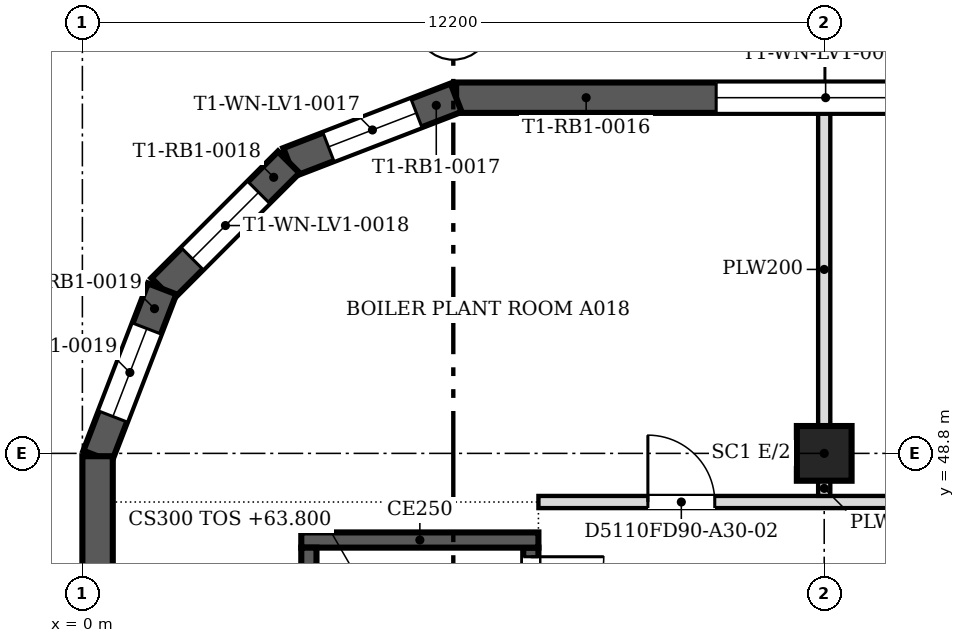
"""IFC4 building model, lengths in metres.
Left out: names, types, materials, properties, quantities, classifications, styles, units other than length and angle.
Written with IfcOpenShell. Run it as: python <this file> out.ifc"""

import sys

from ifc_helpers import new_model, si_unit, direction, frame, frame_2d, origin, origin_2d, place, context, subcontext, project, spatial, polyline, rectangle, outline, extrude, faceted_brep, source, transform, mapped, element, fill, save


model = new_model("IFC4")
c1 = context("Model", 3, precision=1e-05, world=origin(), true_north=direction((0.0, 1.0)))
c2 = subcontext(c1, "Body", "Model", "MODEL_VIEW")
j1 = project(units=[si_unit("LENGTHUNIT", "METRE"), si_unit("PLANEANGLEUNIT", "RADIAN")], contexts=[c1])
p1 = place(None, origin())
s1 = spatial("IfcSite", under=j1, at=p1, CompositionType="ELEMENT")
p2 = place(p1, origin())
s2 = spatial("IfcBuilding", under=s1, at=p2, CompositionType="ELEMENT")
p3 = place(p2, frame((0.0, 0.0, 63.8)))
s3 = spatial("IfcBuildingStorey", under=s2, at=p3, CompositionType="ELEMENT", Elevation=63.8)
p4 = place(p3, frame((12.2, 48.8, 0.0), z_axis=(0.0, 0.0, 1.0), x_axis=(1.0, 0.0, 0.0)))
e1 = element("IfcColumn", 1, at=p4, inside=s3, PredefinedType="COLUMN", context=c2, shape_type="SweptSolid", body=[
    extrude(rectangle(XDim=0.9, YDim=0.9, at=origin_2d()), origin(), (0.0, 0.0, 1.0), 4.6),
])
m1 = source(origin(), c2, "Body", "Brep", [
    faceted_brep([(0.0, -0.25, 0.0), (12.154, -0.25, 0.0), (12.154, -0.25, 4.8), (0.0, -0.25, 4.8), (0.0, 0.25, 4.8), (12.107, 0.25, 4.8), (12.107, 0.25, 0.0), (0.0, 0.25, 0.0), (12.154, -0.0, 0.0), (12.154, -0.0, 4.8)], [[[0, 1, 2, 3]], [[4, 5, 6, 7]], [[7, 6, 8, 1, 0]], [[9, 2, 1, 8]], [[5, 4, 3, 2, 9]], [[4, 7, 0, 3]], [[8, 6, 5, 9]]]),
])
p5 = place(p3, frame((18.3, 54.65, 0.0), z_axis=(0.0, 0.0, 1.0), x_axis=(-1.0, 0.0, 0.0)))
e2 = element("IfcWall", 2, at=p5, inside=s3, PredefinedType="SOLIDWALL", context=c2, shape_type="MappedRepresentation", body=[
    mapped(m1, transform((0.0, 0.0, 0.0), scale=1.0)),
])
m2 = source(origin(), c2, "Body", "SweptSolid", [
    extrude(outline(polyline([(4.277, 0.8), (7.877, 0.8), (7.877, 4.0), (4.277, 4.0), (4.277, 0.8)])), frame((0.0, 0.26, 0.0), z_axis=(0.0, -1.0, 0.0), x_axis=(1.0, 0.0, 0.0)), (0.0, 0.0, 1.0), 0.52),
])
p6 = place(p5, origin())
e3 = element("IfcOpeningElement", 3, at=p6, cuts=e2, PredefinedType="OPENING", context=c2, shape_type="MappedRepresentation", body=[
    mapped(m2, transform((0.0, 0.0, 0.0), scale=1.0)),
])
m3 = source(origin(), c2, "Body", "Brep", [
    faceted_brep([(0.0, -0.25, 0.0), (2.95, -0.25, 0.0), (2.95, -0.25, 4.8), (0.0, -0.25, 4.8), (0.047, 0.25, 4.8), (2.898, 0.25, 4.8), (2.898, 0.25, 0.0), (0.047, 0.25, 0.0), (2.95, 0.0, 0.0), (0.0, 0.0, 0.0), (2.95, 0.0, 4.8), (0.0, 0.0, 4.8)], [[[0, 1, 2, 3]], [[4, 5, 6, 7]], [[7, 6, 8, 1, 0, 9]], [[10, 2, 1, 8]], [[5, 4, 11, 3, 2, 10]], [[9, 0, 3, 11]], [[7, 9, 11, 4]], [[8, 6, 5, 10]]]),
])
p7 = place(p3, frame((6.146, 54.65, 0.0), z_axis=(0.0, 0.0, 1.0), x_axis=(-0.932999673775, -0.359877213415, 0.0)))
e4 = element("IfcWall", 4, at=p7, inside=s3, PredefinedType="SOLIDWALL", context=c2, shape_type="MappedRepresentation", body=[
    mapped(m3, transform((0.0, 0.0, 0.0), scale=1.0)),
])
m4 = source(origin(), c2, "Body", "SweptSolid", [
    extrude(outline(polyline([(0.7, 0.8), (2.25, 0.8), (2.25, 4.0), (0.7, 4.0), (0.7, 0.8)])), frame((0.0, 0.26, 0.0), z_axis=(0.0, -1.0, 0.0), x_axis=(1.0, 0.0, 0.0)), (0.0, 0.0, 1.0), 0.52),
])
p8 = place(p7, origin())
e5 = element("IfcOpeningElement", 5, at=p8, cuts=e4, PredefinedType="OPENING", context=c2, shape_type="MappedRepresentation", body=[
    mapped(m4, transform((0.0, 0.0, 0.0), scale=1.0)),
])
m5 = source(origin(), c2, "Body", "Brep", [
    faceted_brep([(0.0, -0.25, 0.0), (2.944, -0.25, 0.0), (2.944, -0.25, 4.8), (0.0, -0.25, 4.8), (0.053, 0.25, 4.8), (2.891, 0.25, 4.8), (2.891, 0.25, 0.0), (0.053, 0.25, 0.0), (2.944, 0.0, 0.0), (0.0, 0.0, 0.0), (2.944, 0.0, 4.8), (0.0, 0.0, 4.8)], [[[0, 1, 2, 3]], [[4, 5, 6, 7]], [[7, 6, 8, 1, 0, 9]], [[10, 2, 1, 8]], [[5, 4, 11, 3, 2, 10]], [[9, 0, 3, 11]], [[7, 9, 11, 4]], [[8, 6, 5, 10]]]),
])
p9 = place(p3, frame((3.394, 53.588, 0.0), z_axis=(0.0, 0.0, 1.0), x_axis=(-0.707106781187, -0.707106781187, 0.0)))
e6 = element("IfcWall", 6, at=p9, inside=s3, PredefinedType="SOLIDWALL", context=c2, shape_type="MappedRepresentation", body=[
    mapped(m5, transform((0.0, 0.0, 0.0), scale=1.0)),
])
m6 = source(origin(), c2, "Body", "SweptSolid", [
    extrude(outline(polyline([(0.7, 0.8), (2.244, 0.8), (2.244, 4.0), (0.7, 4.0), (0.7, 0.8)])), frame((0.0, 0.26, 0.0), z_axis=(0.0, -1.0, 0.0), x_axis=(1.0, 0.0, 0.0)), (0.0, 0.0, 1.0), 0.52),
])
p10 = place(p9, origin())
e7 = element("IfcOpeningElement", 7, at=p10, cuts=e6, PredefinedType="OPENING", context=c2, shape_type="MappedRepresentation", body=[
    mapped(m6, transform((0.0, 0.0, 0.0), scale=1.0)),
])
m7 = source(origin(), c2, "Body", "Brep", [
    faceted_brep([(0.0, -0.25, 0.0), (2.95, -0.25, 0.0), (2.95, -0.25, 4.8), (0.0, -0.25, 4.8), (0.053, 0.25, 4.8), (2.904, 0.25, 4.8), (2.904, 0.25, 0.0), (0.053, 0.25, 0.0), (2.95, 0.0, 0.0), (0.0, 0.0, 0.0), (2.95, 0.0, 4.8), (0.0, 0.0, 4.8)], [[[0, 1, 2, 3]], [[4, 5, 6, 7]], [[7, 6, 8, 1, 0, 9]], [[10, 2, 1, 8]], [[5, 4, 11, 3, 2, 10]], [[9, 0, 3, 11]], [[7, 9, 11, 4]], [[8, 6, 5, 10]]]),
])
p11 = place(p3, frame((1.312, 51.506, 0.0), z_axis=(0.0, 0.0, 1.0), x_axis=(-0.359921456299, -0.932982607178, 0.0)))
e8 = element("IfcWall", 8, at=p11, inside=s3, PredefinedType="SOLIDWALL", context=c2, shape_type="MappedRepresentation", body=[
    mapped(m7, transform((0.0, 0.0, 0.0), scale=1.0)),
])
p12 = place(p11, origin())
e9 = element("IfcOpeningElement", 9, at=p12, cuts=e8, PredefinedType="OPENING", context=c2, shape_type="MappedRepresentation", body=[
    mapped(m4, transform((0.0, 0.0, 0.0), scale=1.0)),
])
m8 = source(origin(), c2, "Body", "Brep", [
    faceted_brep([(0.0, -0.25, 0.0), (12.154, -0.25, 0.0), (12.154, -0.25, 4.8), (0.0, -0.25, 4.8), (0.047, 0.25, 4.8), (12.154, 0.25, 4.8), (12.154, 0.25, 0.0), (0.047, 0.25, 0.0), (0.0, 0.0, 0.0), (0.0, 0.0, 4.8)], [[[0, 1, 2, 3]], [[4, 5, 6, 7]], [[7, 6, 1, 0, 8]], [[5, 4, 9, 3, 2]], [[8, 0, 3, 9]], [[7, 8, 9, 4]], [[1, 6, 5, 2]]]),
])
p13 = place(p3, frame((0.25, 48.753, 0.0), z_axis=(0.0, 0.0, 1.0), x_axis=(0.0, -1.0, 0.0)))
e10 = element("IfcWall", 10, at=p13, inside=s3, PredefinedType="SOLIDWALL", context=c2, shape_type="MappedRepresentation", body=[
    mapped(m8, transform((0.0, 0.0, 0.0), scale=1.0)),
])
p14 = place(p13, origin())
e11 = element("IfcOpeningElement", 11, at=p14, cuts=e10, PredefinedType="OPENING", context=c2, shape_type="MappedRepresentation", body=[
    mapped(m2, transform((0.0, 0.0, 0.0), scale=1.0)),
])
p15 = place(p3, frame((3.725, 39.25, 0.0), z_axis=(0.0, 0.0, 1.0), x_axis=(0.0, 1.0, 0.0)))
e12 = element("IfcWall", 12, at=p15, inside=s3, PredefinedType="SOLIDWALL", context=c2, shape_type="SweptSolid", body=[
    extrude(rectangle(XDim=8.0, YDim=0.25, at=frame_2d((4.0, 0.0))), origin(), (0.0, 0.0, 1.0), 4.8),
])
p16 = place(p3, frame((3.6, 47.375, 0.0), z_axis=(0.0, 0.0, 1.0), x_axis=(1.0, 0.0, 0.0)))
e13 = element("IfcWall", 13, at=p16, inside=s3, PredefinedType="SOLIDWALL", context=c2, shape_type="SweptSolid", body=[
    extrude(rectangle(XDim=3.9, YDim=0.25, at=frame_2d((1.95, 0.0))), origin(), (0.0, 0.0, 1.0), 4.8),
])
p17 = place(p3, frame((7.375, 47.25, 0.0), z_axis=(0.0, 0.0, 1.0), x_axis=(0.0, -1.0, 0.0)))
e14 = element("IfcWall", 14, at=p17, inside=s3, PredefinedType="SOLIDWALL", context=c2, shape_type="SweptSolid", body=[
    extrude(rectangle(XDim=8.0, YDim=0.25, at=frame_2d((4.0, 0.0))), origin(), (0.0, 0.0, 1.0), 4.8),
])
m9 = source(origin(), c2, "Body", "SweptSolid", [
    extrude(rectangle(XDim=1.2, YDim=2.1, at=frame_2d((0.6, 1.05))), frame((0.0, 0.135, 0.0), z_axis=(0.0, -1.0, 0.0), x_axis=(1.0, 0.0, 0.0)), (0.0, 0.0, 1.0), 0.27),
])
p18 = place(p17, frame((0.15, 0.0, 0.0)))
e15 = element("IfcOpeningElement", 15, at=p18, cuts=e14, PredefinedType="OPENING", context=c2, shape_type="MappedRepresentation", body=[
    mapped(m9, transform((0.0, 0.0, 0.0), scale=1.0)),
])
p19 = place(p3, frame((7.5, 48.0, 0.0), z_axis=(0.0, 0.0, 1.0), x_axis=(1.0, 0.0, 0.0)))
e16 = element("IfcWall", 16, at=p19, inside=s3, PredefinedType="PARTITIONING", context=c2, shape_type="SweptSolid", body=[
    extrude(rectangle(XDim=20.6, YDim=0.2, at=frame_2d((10.3, 0.0))), origin(), (0.0, 0.0, 1.0), 4.067),
])
m10 = source(origin(), c2, "Body", "SweptSolid", [
    extrude(rectangle(XDim=1.1, YDim=2.1, at=frame_2d((0.55, 1.05))), frame((0.0, 0.11, 0.0), z_axis=(0.0, -1.0, 0.0), x_axis=(1.0, 0.0, 0.0)), (0.0, 0.0, 1.0), 0.22),
])
p20 = place(p19, frame((1.8, 0.0, 0.0)))
e17 = element("IfcOpeningElement", 17, at=p20, cuts=e16, PredefinedType="OPENING", context=c2, shape_type="MappedRepresentation", body=[
    mapped(m10, transform((0.0, 0.0, 0.0), scale=1.0)),
])
p21 = place(p19, frame((15.301, 0.0, 0.0)))
e18 = element("IfcOpeningElement", 18, at=p21, cuts=e16, PredefinedType="OPENING", context=c2, shape_type="MappedRepresentation", body=[
    mapped(m10, transform((0.0, 0.0, 0.0), scale=1.0)),
])
p22 = place(p19, frame((8.3, 0.0, 0.0)))
e19 = element("IfcOpeningElement", 19, at=p22, cuts=e16, PredefinedType="OPENING", context=c2, shape_type="MappedRepresentation", body=[
    mapped(m10, transform((0.0, 0.0, 0.0), scale=1.0)),
])
p23 = place(p3, frame((12.2, 48.101, 0.0), z_axis=(0.0, 0.0, 1.0), x_axis=(0.0, 1.0, 0.0)))
e20 = element("IfcWall", 20, at=p23, inside=s3, PredefinedType="PARTITIONING", context=c2, shape_type="SweptSolid", body=[
    extrude(rectangle(XDim=0.248, YDim=0.2, at=frame_2d((0.124, 0.0))), origin(), (0.0, 0.0, 1.0), 4.067),
])
p24 = place(p3, frame((12.2, 49.251, 0.0), z_axis=(0.0, 0.0, 1.0), x_axis=(0.0, 1.0, 0.0)))
e21 = element("IfcWall", 21, at=p24, inside=s3, PredefinedType="PARTITIONING", context=c2, shape_type="SweptSolid", body=[
    extrude(rectangle(XDim=5.149, YDim=0.2, at=frame_2d((2.574, 0.0))), origin(), (0.0, 0.0, 1.0), 4.067),
])
m11 = source(origin(), c2, "Body", "SweptSolid", [
    extrude(outline(polyline([(4.277, 0.8), (7.877, 0.8), (7.877, 4.0), (4.277, 4.0), (4.277, 0.8)])), frame((0.0, 0.03, 0.0), z_axis=(0.0, -1.0, 0.0), x_axis=(1.0, 0.0, 0.0)), (0.0, 0.0, 1.0), 0.06),
])
p25 = place(p6, origin())
e22 = element("IfcWindow", 22, at=p25, inside=s3, PartitioningType="USERDEFINED", PredefinedType="WINDOW", context=c2, shape_type="MappedRepresentation", body=[
    mapped(m11, transform((0.0, 0.0, 0.0), scale=1.0)),
])
fill(e3, e22)
m12 = source(origin(), c2, "Body", "SweptSolid", [
    extrude(outline(polyline([(0.7, 0.8), (2.25, 0.8), (2.25, 4.0), (0.7, 4.0), (0.7, 0.8)])), frame((0.0, 0.03, 0.0), z_axis=(0.0, -1.0, 0.0), x_axis=(1.0, 0.0, 0.0)), (0.0, 0.0, 1.0), 0.06),
])
p26 = place(p8, origin())
e23 = element("IfcWindow", 23, at=p26, inside=s3, PartitioningType="USERDEFINED", PredefinedType="WINDOW", context=c2, shape_type="MappedRepresentation", body=[
    mapped(m12, transform((0.0, 0.0, 0.0), scale=1.0)),
])
fill(e5, e23)
m13 = source(origin(), c2, "Body", "SweptSolid", [
    extrude(outline(polyline([(0.7, 0.8), (2.244, 0.8), (2.244, 4.0), (0.7, 4.0), (0.7, 0.8)])), frame((0.0, 0.03, 0.0), z_axis=(0.0, -1.0, 0.0), x_axis=(1.0, 0.0, 0.0)), (0.0, 0.0, 1.0), 0.06),
])
p27 = place(p10, origin())
e24 = element("IfcWindow", 24, at=p27, inside=s3, PartitioningType="USERDEFINED", PredefinedType="WINDOW", context=c2, shape_type="MappedRepresentation", body=[
    mapped(m13, transform((0.0, 0.0, 0.0), scale=1.0)),
])
fill(e7, e24)
p28 = place(p12, origin())
e25 = element("IfcWindow", 25, at=p28, inside=s3, PartitioningType="USERDEFINED", PredefinedType="WINDOW", context=c2, shape_type="MappedRepresentation", body=[
    mapped(m12, transform((0.0, 0.0, 0.0), scale=1.0)),
])
fill(e9, e25)
m14 = source(origin(), c2, "Body", "SweptSolid", [
    extrude(rectangle(XDim=1.2, YDim=2.1, at=frame_2d((0.6, 1.05))), frame((0.0, 0.025, 0.0), z_axis=(0.0, -1.0, 0.0), x_axis=(1.0, 0.0, 0.0)), (0.0, 0.0, 1.0), 0.05),
])
p29 = place(p18, origin())
e26 = element("IfcDoor", 26, at=p29, inside=s3, OperationType="SINGLE_SWING_LEFT", PredefinedType="DOOR", context=c2, shape_type="MappedRepresentation", body=[
    mapped(m14, transform((0.0, 0.0, 0.0), scale=1.0)),
])
fill(e15, e26)
m15 = source(origin(), c2, "Body", "SweptSolid", [
    extrude(rectangle(XDim=1.1, YDim=2.1, at=frame_2d((0.55, 1.05))), frame((0.0, 0.025, 0.0), z_axis=(0.0, -1.0, 0.0), x_axis=(1.0, 0.0, 0.0)), (0.0, 0.0, 1.0), 0.05),
])
p30 = place(p20, origin())
e27 = element("IfcDoor", 27, at=p30, inside=s3, OperationType="SINGLE_SWING_LEFT", PredefinedType="DOOR", context=c2, shape_type="MappedRepresentation", body=[
    mapped(m15, transform((0.0, 0.0, 0.0), scale=1.0)),
])
fill(e17, e27)
save(model, sys.argv[1])
